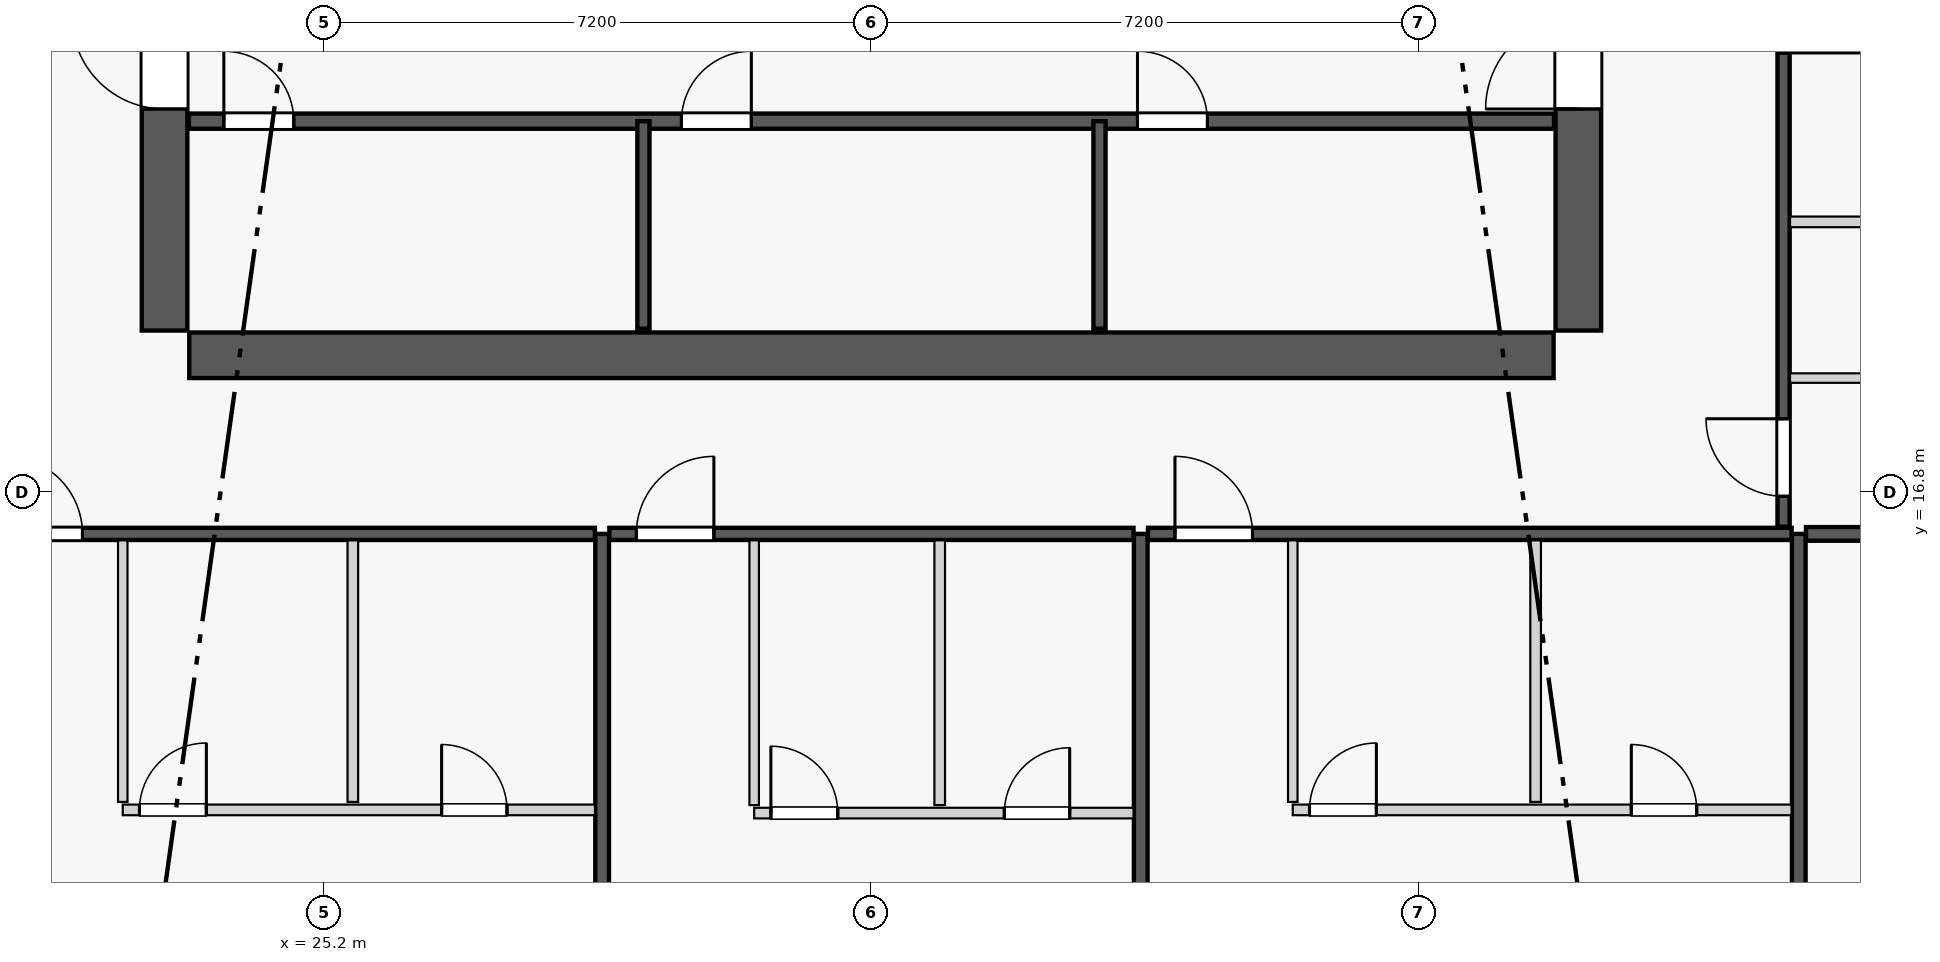
"""IFC4 building model, lengths in metres.
Left out: names, types, materials, properties, quantities, classifications, styles, units other than length and angle.
Written with IfcOpenShell. Run it as: python <this file> out.ifc"""

import sys

from ifc_helpers import new_model, si_unit, direction, frame, frame_2d, origin, origin_2d, place, context, subcontext, project, spatial, rectangle, extrude, element, fill, save


model = new_model("IFC4")
c1 = context("Model", 3, precision=1e-05, world=origin(), true_north=direction((0.0, 1.0)))
c2 = subcontext(c1, "Body", "Model", "MODEL_VIEW")
j1 = project(units=[si_unit("LENGTHUNIT", "METRE"), si_unit("PLANEANGLEUNIT", "RADIAN")], contexts=[c1])
p1 = place(None, origin())
s1 = spatial("IfcSite", under=j1, at=p1, CompositionType="ELEMENT")
p2 = place(p1, origin())
s2 = spatial("IfcBuilding", under=s1, at=p2, CompositionType="ELEMENT")
p3 = place(p2, frame((0.0, 0.0, 186.1)))
s3 = spatial("IfcBuildingStorey", under=s2, at=p3, CompositionType="ELEMENT", Elevation=186.1)
for number, where, z_axis, x_axis in (
    (1, (23.1, 18.6, 0.0), (0.0, 0.0, 1.0), (1.0, 0.0, 0.0)),
    (2, (41.7, 18.6, 0.0), (0.0, 0.0, 1.0), (1.0, 0.0, 0.0)),
):
    element("IfcColumn", number, at=place(p3, frame(where, z_axis=z_axis, x_axis=x_axis)), inside=s3, PredefinedType="COLUMN", context=c2, shape_type="SweptSolid", body=[
        extrude(rectangle(XDim=0.65, YDim=0.65, at=origin_2d()), origin(), (0.0, 0.0, 1.0), 3.55),
    ])
p4 = place(p3, frame((23.425, 18.6, 0.0), z_axis=(0.0, 0.0, 1.0), x_axis=(1.0, 0.0, 0.0)))
e3 = element("IfcWall", 3, at=p4, inside=s3, PredefinedType="SHEAR", context=c2, shape_type="SweptSolid", body=[
    extrude(rectangle(XDim=17.95, YDim=0.6, at=frame_2d((8.975, 0.0))), origin(), (0.0, 0.0, 1.0), 3.35),
])
p5 = place(p3, frame((23.1, 18.925, 0.0), z_axis=(0.0, 0.0, 1.0), x_axis=(0.0, 1.0, 0.0)))
e4 = element("IfcWall", 4, at=p5, inside=s3, PredefinedType="SHEAR", context=c2, shape_type="SweptSolid", body=[
    extrude(rectangle(XDim=13.95, YDim=0.6, at=frame_2d((6.975, 0.0))), origin(), (0.0, 0.0, 1.0), 3.35),
])
p6 = place(p5, frame((2.915, 0.0, 0.0)))
e5 = element("IfcOpeningElement", 5, at=p6, cuts=e4, PredefinedType="OPENING", context=c2, shape_type="SweptSolid", body=[
    extrude(rectangle(XDim=1.22, YDim=2.25, at=frame_2d((0.61, 1.125))), frame((0.0, 0.31, 0.0), z_axis=(0.0, -1.0, 0.0), x_axis=(1.0, 0.0, 0.0)), (0.0, 0.0, 1.0), 0.62),
])
p7 = place(p3, frame((41.7, 18.925, 0.0), z_axis=(0.0, 0.0, 1.0), x_axis=(0.0, 1.0, 0.0)))
e6 = element("IfcWall", 6, at=p7, inside=s3, PredefinedType="SHEAR", context=c2, shape_type="SweptSolid", body=[
    extrude(rectangle(XDim=13.95, YDim=0.6, at=frame_2d((6.975, 0.0))), origin(), (0.0, 0.0, 1.0), 3.35),
])
p8 = place(p7, frame((2.915, 0.0, 0.0)))
e7 = element("IfcOpeningElement", 7, at=p8, cuts=e6, PredefinedType="OPENING", context=c2, shape_type="SweptSolid", body=[
    extrude(rectangle(XDim=1.22, YDim=2.25, at=frame_2d((0.61, 1.125))), frame((0.0, 0.31, 0.0), z_axis=(0.0, -1.0, 0.0), x_axis=(1.0, 0.0, 0.0)), (0.0, 0.0, 1.0), 0.62),
])
p9 = place(p3, frame((23.42, 21.68, 0.0), z_axis=(0.0, 0.0, 1.0), x_axis=(1.0, 0.0, 0.0)))
e8 = element("IfcWall", 8, at=p9, inside=s3, PredefinedType="PLUMBINGWALL", context=c2, shape_type="SweptSolid", body=[
    extrude(rectangle(XDim=17.96, YDim=0.2, at=frame_2d((8.98, 0.0))), origin(), (0.0, 0.0, 1.0), 3.35),
])
p10 = place(p9, frame((0.46, 0.0, 0.0)))
e9 = element("IfcOpeningElement", 9, at=p10, cuts=e8, PredefinedType="OPENING", context=c2, shape_type="SweptSolid", body=[
    extrude(rectangle(XDim=0.92, YDim=2.15, at=frame_2d((0.46, 1.075))), frame((0.0, 0.11, 0.0), z_axis=(0.0, -1.0, 0.0), x_axis=(1.0, 0.0, 0.0)), (0.0, 0.0, 1.0), 0.22),
])
p11 = place(p9, frame((6.48, 0.0, 0.0)))
e10 = element("IfcOpeningElement", 10, at=p11, cuts=e8, PredefinedType="OPENING", context=c2, shape_type="SweptSolid", body=[
    extrude(rectangle(XDim=0.92, YDim=2.15, at=frame_2d((0.46, 1.075))), frame((0.0, 0.11, 0.0), z_axis=(0.0, -1.0, 0.0), x_axis=(1.0, 0.0, 0.0)), (0.0, 0.0, 1.0), 0.22),
])
p12 = place(p9, frame((12.48, 0.0, 0.0)))
e11 = element("IfcOpeningElement", 11, at=p12, cuts=e8, PredefinedType="OPENING", context=c2, shape_type="SweptSolid", body=[
    extrude(rectangle(XDim=0.92, YDim=2.15, at=frame_2d((0.46, 1.075))), frame((0.0, 0.11, 0.0), z_axis=(0.0, -1.0, 0.0), x_axis=(1.0, 0.0, 0.0)), (0.0, 0.0, 1.0), 0.22),
])
for number, where, z_axis, x_axis in (
    (12, (29.4, 18.95, 0.0), (0.0, 0.0, 1.0), (0.0, 1.0, 0.0)),
    (13, (35.4, 18.95, 0.0), (0.0, 0.0, 1.0), (0.0, 1.0, 0.0)),
):
    element("IfcWall", number, at=place(p3, frame(where, z_axis=z_axis, x_axis=x_axis)), inside=s3, PredefinedType="PARTITIONING", context=c2, shape_type="SweptSolid", body=[
        extrude(rectangle(XDim=2.73, YDim=0.16, at=frame_2d((1.365, 0.0))), origin(), (0.0, 0.0, 1.0), 3.35),
    ])
for number, where, z_axis, x_axis in (
    (14, (28.857, 5.755, 0.0), (0.0, 0.0, 1.0), (0.0, 1.0, 0.0)),
    (15, (35.943, 5.755, 0.0), (0.0, 0.0, 1.0), (0.0, 1.0, 0.0)),
):
    element("IfcWall", number, at=place(p3, frame(where, z_axis=z_axis, x_axis=x_axis)), inside=s3, PredefinedType="PARTITIONING", context=c2, shape_type="SweptSolid", body=[
        extrude(rectangle(XDim=10.495, YDim=0.18, at=frame_2d((5.248, 0.0))), origin(), (0.0, 0.0, 1.0), 2.807),
    ])
p13 = place(p3, frame((44.6, 5.968, 0.0), z_axis=(0.0, 0.0, 1.0), x_axis=(0.0, 1.0, 0.0)))
e16 = element("IfcWall", 16, at=p13, inside=s3, PredefinedType="PARTITIONING", context=c2, shape_type="SweptSolid", body=[
    extrude(rectangle(XDim=10.282, YDim=0.18, at=frame_2d((5.141, 0.0))), origin(), (0.0, 0.0, 1.0), 3.35),
])
p14 = place(p3, frame((20.295, 16.25, 0.0), z_axis=(0.0, 0.0, 1.0), x_axis=(1.0, 0.0, 0.0)))
e17 = element("IfcWall", 17, at=p14, inside=s3, PredefinedType="PARTITIONING", context=c2, shape_type="SweptSolid", body=[
    extrude(rectangle(XDim=8.467, YDim=0.16, at=frame_2d((4.233, 0.0))), origin(), (0.0, 0.0, 1.0), 3.35),
])
p15 = place(p14, frame((0.705, 0.0, 0.0)))
e18 = element("IfcOpeningElement", 18, at=p15, cuts=e17, PredefinedType="OPENING", context=c2, shape_type="SweptSolid", body=[
    extrude(rectangle(XDim=1.02, YDim=2.25, at=frame_2d((0.51, 1.125))), frame((0.0, 0.09, 0.0), z_axis=(0.0, -1.0, 0.0), x_axis=(1.0, 0.0, 0.0)), (0.0, 0.0, 1.0), 0.18),
])
p16 = place(p3, frame((22.55, 12.724, 0.0), z_axis=(0.0, 0.0, 1.0), x_axis=(0.0, 1.0, 0.0)))
e19 = element("IfcWall", 19, at=p16, inside=s3, PredefinedType="PARTITIONING", context=c2, shape_type="SweptSolid", body=[
    extrude(rectangle(XDim=3.441, YDim=0.125, at=frame_2d((1.72, 0.0))), origin(), (0.0, 0.0, 1.0), 2.807),
])
p17 = place(p3, frame((22.55, 12.619, 0.0), z_axis=(0.0, 0.0, 1.0), x_axis=(1.0, 0.0, 0.0)))
e20 = element("IfcWall", 20, at=p17, inside=s3, PredefinedType="PLUMBINGWALL", context=c2, shape_type="SweptSolid", body=[
    extrude(rectangle(XDim=6.212, YDim=0.14, at=frame_2d((3.106, 0.0))), origin(), (0.0, 0.0, 1.0), 3.35),
])
p18 = place(p17, frame((4.195, 0.0, 0.0)))
e21 = element("IfcOpeningElement", 21, at=p18, cuts=e20, PredefinedType="OPENING", context=c2, shape_type="SweptSolid", body=[
    extrude(rectangle(XDim=0.86, YDim=2.1, at=frame_2d((0.43, 1.05))), frame((0.0, 0.08, 0.0), z_axis=(0.0, -1.0, 0.0), x_axis=(1.0, 0.0, 0.0)), (0.0, 0.0, 1.0), 0.16),
])
p19 = place(p17, frame((0.22, 0.0, 0.0)))
e22 = element("IfcOpeningElement", 22, at=p19, cuts=e20, PredefinedType="OPENING", context=c2, shape_type="SweptSolid", body=[
    extrude(rectangle(XDim=0.88, YDim=2.15, at=frame_2d((0.44, 1.075))), frame((0.0, 0.08, 0.0), z_axis=(0.0, -1.0, 0.0), x_axis=(1.0, 0.0, 0.0)), (0.0, 0.0, 1.0), 0.16),
])
p20 = place(p3, frame((25.577, 12.724, 0.0), z_axis=(0.0, 0.0, 1.0), x_axis=(0.0, 1.0, 0.0)))
e23 = element("IfcWall", 23, at=p20, inside=s3, PredefinedType="PLUMBINGWALL", context=c2, shape_type="SweptSolid", body=[
    extrude(rectangle(XDim=3.441, YDim=0.14, at=frame_2d((1.72, 0.0))), origin(), (0.0, 0.0, 1.0), 3.35),
])
p21 = place(p3, frame((28.952, 16.25, 0.0), z_axis=(0.0, 0.0, 1.0), x_axis=(1.0, 0.0, 0.0)))
e24 = element("IfcWall", 24, at=p21, inside=s3, PredefinedType="PARTITIONING", context=c2, shape_type="SweptSolid", body=[
    extrude(rectangle(XDim=6.896, YDim=0.16, at=frame_2d((3.448, 0.0))), origin(), (0.0, 0.0, 1.0), 3.35),
])
p22 = place(p21, frame((0.355, 0.0, 0.0)))
e25 = element("IfcOpeningElement", 25, at=p22, cuts=e24, PredefinedType="OPENING", context=c2, shape_type="SweptSolid", body=[
    extrude(rectangle(XDim=1.02, YDim=2.25, at=frame_2d((0.51, 1.125))), frame((0.0, 0.09, 0.0), z_axis=(0.0, -1.0, 0.0), x_axis=(1.0, 0.0, 0.0)), (0.0, 0.0, 1.0), 0.18),
])
p23 = place(p3, frame((30.857, 12.682, 0.0), z_axis=(0.0, 0.0, 1.0), x_axis=(0.0, 1.0, 0.0)))
e26 = element("IfcWall", 26, at=p23, inside=s3, PredefinedType="PARTITIONING", context=c2, shape_type="SweptSolid", body=[
    extrude(rectangle(XDim=3.483, YDim=0.125, at=frame_2d((1.742, 0.0))), origin(), (0.0, 0.0, 1.0), 3.35),
])
p24 = place(p3, frame((30.857, 12.577, 0.0), z_axis=(0.0, 0.0, 1.0), x_axis=(1.0, 0.0, 0.0)))
e27 = element("IfcWall", 27, at=p24, inside=s3, PredefinedType="PLUMBINGWALL", context=c2, shape_type="SweptSolid", body=[
    extrude(rectangle(XDim=4.991, YDim=0.14, at=frame_2d((2.496, 0.0))), origin(), (0.0, 0.0, 1.0), 3.35),
])
p25 = place(p24, frame((3.291, 0.0, 0.0)))
e28 = element("IfcOpeningElement", 28, at=p25, cuts=e27, PredefinedType="OPENING", context=c2, shape_type="SweptSolid", body=[
    extrude(rectangle(XDim=0.86, YDim=2.1, at=frame_2d((0.43, 1.05))), frame((0.0, 0.08, 0.0), z_axis=(0.0, -1.0, 0.0), x_axis=(1.0, 0.0, 0.0)), (0.0, 0.0, 1.0), 0.16),
])
p26 = place(p24, frame((0.22, 0.0, 0.0)))
e29 = element("IfcOpeningElement", 29, at=p26, cuts=e27, PredefinedType="OPENING", context=c2, shape_type="SweptSolid", body=[
    extrude(rectangle(XDim=0.88, YDim=2.15, at=frame_2d((0.44, 1.075))), frame((0.0, 0.08, 0.0), z_axis=(0.0, -1.0, 0.0), x_axis=(1.0, 0.0, 0.0)), (0.0, 0.0, 1.0), 0.16),
])
p27 = place(p3, frame((33.298, 12.682, 0.0), z_axis=(0.0, 0.0, 1.0), x_axis=(0.0, 1.0, 0.0)))
e30 = element("IfcWall", 30, at=p27, inside=s3, PredefinedType="PLUMBINGWALL", context=c2, shape_type="SweptSolid", body=[
    extrude(rectangle(XDim=3.483, YDim=0.14, at=frame_2d((1.742, 0.0))), origin(), (0.0, 0.0, 1.0), 3.35),
])
p28 = place(p3, frame((36.038, 16.25, 0.0), z_axis=(0.0, 0.0, 1.0), x_axis=(1.0, 0.0, 0.0)))
e31 = element("IfcWall", 31, at=p28, inside=s3, PredefinedType="PARTITIONING", context=c2, shape_type="SweptSolid", body=[
    extrude(rectangle(XDim=8.467, YDim=0.16, at=frame_2d((4.233, 0.0))), origin(), (0.0, 0.0, 1.0), 3.35),
])
p29 = place(p28, frame((0.355, 0.0, 0.0)))
e32 = element("IfcOpeningElement", 32, at=p29, cuts=e31, PredefinedType="OPENING", context=c2, shape_type="SweptSolid", body=[
    extrude(rectangle(XDim=1.02, YDim=2.25, at=frame_2d((0.51, 1.125))), frame((0.0, 0.09, 0.0), z_axis=(0.0, -1.0, 0.0), x_axis=(1.0, 0.0, 0.0)), (0.0, 0.0, 1.0), 0.18),
])
p30 = place(p3, frame((37.943, 12.724, 0.0), z_axis=(0.0, 0.0, 1.0), x_axis=(0.0, 1.0, 0.0)))
e33 = element("IfcWall", 33, at=p30, inside=s3, PredefinedType="PARTITIONING", context=c2, shape_type="SweptSolid", body=[
    extrude(rectangle(XDim=3.441, YDim=0.125, at=frame_2d((1.72, 0.0))), origin(), (0.0, 0.0, 1.0), 3.35),
])
p31 = place(p3, frame((37.943, 12.619, 0.0), z_axis=(0.0, 0.0, 1.0), x_axis=(1.0, 0.0, 0.0)))
e34 = element("IfcWall", 34, at=p31, inside=s3, PredefinedType="PLUMBINGWALL", context=c2, shape_type="SweptSolid", body=[
    extrude(rectangle(XDim=6.562, YDim=0.14, at=frame_2d((3.281, 0.0))), origin(), (0.0, 0.0, 1.0), 3.35),
])
p32 = place(p31, frame((4.454, 0.0, 0.0)))
e35 = element("IfcOpeningElement", 35, at=p32, cuts=e34, PredefinedType="OPENING", context=c2, shape_type="SweptSolid", body=[
    extrude(rectangle(XDim=0.86, YDim=2.1, at=frame_2d((0.43, 1.05))), frame((0.0, 0.08, 0.0), z_axis=(0.0, -1.0, 0.0), x_axis=(1.0, 0.0, 0.0)), (0.0, 0.0, 1.0), 0.16),
])
p33 = place(p31, frame((0.22, 0.0, 0.0)))
e36 = element("IfcOpeningElement", 36, at=p33, cuts=e34, PredefinedType="OPENING", context=c2, shape_type="SweptSolid", body=[
    extrude(rectangle(XDim=0.88, YDim=2.15, at=frame_2d((0.44, 1.075))), frame((0.0, 0.08, 0.0), z_axis=(0.0, -1.0, 0.0), x_axis=(1.0, 0.0, 0.0)), (0.0, 0.0, 1.0), 0.16),
])
p34 = place(p3, frame((41.138, 12.724, 0.0), z_axis=(0.0, 0.0, 1.0), x_axis=(0.0, 1.0, 0.0)))
e37 = element("IfcWall", 37, at=p34, inside=s3, PredefinedType="PLUMBINGWALL", context=c2, shape_type="SweptSolid", body=[
    extrude(rectangle(XDim=3.441, YDim=0.14, at=frame_2d((1.72, 0.0))), origin(), (0.0, 0.0, 1.0), 3.35),
])
p35 = place(p3, frame((44.695, 16.25, 0.0), z_axis=(0.0, 0.0, 1.0), x_axis=(1.0, 0.0, 0.0)))
e38 = element("IfcWall", 38, at=p35, inside=s3, PredefinedType="PARTITIONING", context=c2, shape_type="SweptSolid", body=[
    extrude(rectangle(XDim=5.894, YDim=0.18, at=frame_2d((2.947, 0.0))), origin(), (0.0, 0.0, 1.0), 3.35),
])
p36 = place(p3, frame((44.4, 16.345, 0.0), z_axis=(0.0, 0.0, 1.0), x_axis=(0.0, 1.0, 0.0)))
e39 = element("IfcWall", 39, at=p36, inside=s3, PredefinedType="PARTITIONING", context=c2, shape_type="SweptSolid", body=[
    extrude(rectangle(XDim=6.236, YDim=0.16, at=frame_2d((3.118, 0.0))), origin(), (0.0, 0.0, 1.0), 3.35),
])
p37 = place(p36, frame((0.4, 0.0, 0.0)))
e40 = element("IfcOpeningElement", 40, at=p37, cuts=e39, PredefinedType="OPENING", context=c2, shape_type="SweptSolid", body=[
    extrude(rectangle(XDim=1.02, YDim=2.25, at=frame_2d((0.51, 1.125))), frame((0.0, 0.09, 0.0), z_axis=(0.0, -1.0, 0.0), x_axis=(1.0, 0.0, 0.0)), (0.0, 0.0, 1.0), 0.18),
])
p38 = place(p3, frame((44.485, 18.3, 0.0), z_axis=(0.0, 0.0, 1.0), x_axis=(1.0, 0.0, 0.0)))
e41 = element("IfcWall", 41, at=p38, inside=s3, PredefinedType="PARTITIONING", context=c2, shape_type="SweptSolid", body=[
    extrude(rectangle(XDim=2.43, YDim=0.125, at=frame_2d((1.215, 0.0))), origin(), (0.0, 0.0, 1.0), 2.807),
])
p39 = place(p3, frame((44.485, 20.355, 0.0), z_axis=(0.0, 0.0, 1.0), x_axis=(1.0, 0.0, 0.0)))
e42 = element("IfcWall", 42, at=p39, inside=s3, PredefinedType="PLUMBINGWALL", context=c2, shape_type="SweptSolid", body=[
    extrude(rectangle(XDim=2.43, YDim=0.14, at=frame_2d((1.215, 0.0))), origin(), (0.0, 0.0, 1.0), 3.35),
])
p40 = place(p6, origin())
e43 = element("IfcDoor", 43, at=p40, inside=s3, OperationType="SINGLE_SWING_RIGHT", PredefinedType="DOOR", context=c2, shape_type="SweptSolid", body=[
    extrude(rectangle(XDim=1.22, YDim=2.25, at=frame_2d((0.61, 1.125))), frame((0.0, 0.025, 0.0), z_axis=(0.0, -1.0, 0.0), x_axis=(1.0, 0.0, 0.0)), (0.0, 0.0, 1.0), 0.05),
])
fill(e5, e43)
p41 = place(p8, origin())
e44 = element("IfcDoor", 44, at=p41, inside=s3, OperationType="SINGLE_SWING_LEFT", PredefinedType="DOOR", context=c2, shape_type="SweptSolid", body=[
    extrude(rectangle(XDim=1.22, YDim=2.25, at=frame_2d((0.61, 1.125))), frame((0.0, 0.025, 0.0), z_axis=(0.0, -1.0, 0.0), x_axis=(1.0, 0.0, 0.0)), (0.0, 0.0, 1.0), 0.05),
])
fill(e7, e44)
p42 = place(p10, origin())
e45 = element("IfcDoor", 45, at=p42, inside=s3, OperationType="SINGLE_SWING_LEFT", PredefinedType="DOOR", context=c2, shape_type="SweptSolid", body=[
    extrude(rectangle(XDim=0.92, YDim=2.15, at=frame_2d((0.46, 1.075))), frame((0.0, 0.025, 0.0), z_axis=(0.0, -1.0, 0.0), x_axis=(1.0, 0.0, 0.0)), (0.0, 0.0, 1.0), 0.05),
])
fill(e9, e45)
p43 = place(p11, origin())
e46 = element("IfcDoor", 46, at=p43, inside=s3, OperationType="SINGLE_SWING_RIGHT", PredefinedType="DOOR", context=c2, shape_type="SweptSolid", body=[
    extrude(rectangle(XDim=0.92, YDim=2.15, at=frame_2d((0.46, 1.075))), frame((0.0, 0.025, 0.0), z_axis=(0.0, -1.0, 0.0), x_axis=(1.0, 0.0, 0.0)), (0.0, 0.0, 1.0), 0.05),
])
fill(e10, e46)
p44 = place(p12, origin())
e47 = element("IfcDoor", 47, at=p44, inside=s3, OperationType="SINGLE_SWING_LEFT", PredefinedType="DOOR", context=c2, shape_type="SweptSolid", body=[
    extrude(rectangle(XDim=0.92, YDim=2.15, at=frame_2d((0.46, 1.075))), frame((0.0, 0.025, 0.0), z_axis=(0.0, -1.0, 0.0), x_axis=(1.0, 0.0, 0.0)), (0.0, 0.0, 1.0), 0.05),
])
fill(e11, e47)
p45 = place(p18, origin())
e48 = element("IfcDoor", 48, at=p45, inside=s3, OperationType="SINGLE_SWING_LEFT", PredefinedType="DOOR", context=c2, shape_type="SweptSolid", body=[
    extrude(rectangle(XDim=0.86, YDim=2.1, at=frame_2d((0.43, 1.05))), frame((0.0, 0.025, 0.0), z_axis=(0.0, -1.0, 0.0), x_axis=(1.0, 0.0, 0.0)), (0.0, 0.0, 1.0), 0.05),
])
fill(e21, e48)
p46 = place(p15, origin())
e49 = element("IfcDoor", 49, at=p46, inside=s3, OperationType="SINGLE_SWING_LEFT", PredefinedType="DOOR", context=c2, shape_type="SweptSolid", body=[
    extrude(rectangle(XDim=1.02, YDim=2.25, at=frame_2d((0.51, 1.125))), frame((0.0, 0.025, 0.0), z_axis=(0.0, -1.0, 0.0), x_axis=(1.0, 0.0, 0.0)), (0.0, 0.0, 1.0), 0.05),
])
fill(e18, e49)
p47 = place(p19, origin())
e50 = element("IfcDoor", 50, at=p47, inside=s3, OperationType="SINGLE_SWING_RIGHT", PredefinedType="DOOR", context=c2, shape_type="SweptSolid", body=[
    extrude(rectangle(XDim=0.88, YDim=2.15, at=frame_2d((0.44, 1.075))), frame((0.0, 0.025, 0.0), z_axis=(0.0, -1.0, 0.0), x_axis=(1.0, 0.0, 0.0)), (0.0, 0.0, 1.0), 0.05),
])
fill(e22, e50)
p48 = place(p25, origin())
e51 = element("IfcDoor", 51, at=p48, inside=s3, OperationType="SINGLE_SWING_RIGHT", PredefinedType="DOOR", context=c2, shape_type="SweptSolid", body=[
    extrude(rectangle(XDim=0.86, YDim=2.1, at=frame_2d((0.43, 1.05))), frame((0.0, 0.025, 0.0), z_axis=(0.0, -1.0, 0.0), x_axis=(1.0, 0.0, 0.0)), (0.0, 0.0, 1.0), 0.05),
])
fill(e28, e51)
p49 = place(p22, origin())
e52 = element("IfcDoor", 52, at=p49, inside=s3, OperationType="SINGLE_SWING_RIGHT", PredefinedType="DOOR", context=c2, shape_type="SweptSolid", body=[
    extrude(rectangle(XDim=1.02, YDim=2.25, at=frame_2d((0.51, 1.125))), frame((0.0, 0.025, 0.0), z_axis=(0.0, -1.0, 0.0), x_axis=(1.0, 0.0, 0.0)), (0.0, 0.0, 1.0), 0.05),
])
fill(e25, e52)
p50 = place(p26, origin())
e53 = element("IfcDoor", 53, at=p50, inside=s3, OperationType="SINGLE_SWING_LEFT", PredefinedType="DOOR", context=c2, shape_type="SweptSolid", body=[
    extrude(rectangle(XDim=0.88, YDim=2.15, at=frame_2d((0.44, 1.075))), frame((0.0, 0.025, 0.0), z_axis=(0.0, -1.0, 0.0), x_axis=(1.0, 0.0, 0.0)), (0.0, 0.0, 1.0), 0.05),
])
fill(e29, e53)
p51 = place(p32, origin())
e54 = element("IfcDoor", 54, at=p51, inside=s3, OperationType="SINGLE_SWING_LEFT", PredefinedType="DOOR", context=c2, shape_type="SweptSolid", body=[
    extrude(rectangle(XDim=0.86, YDim=2.1, at=frame_2d((0.43, 1.05))), frame((0.0, 0.025, 0.0), z_axis=(0.0, -1.0, 0.0), x_axis=(1.0, 0.0, 0.0)), (0.0, 0.0, 1.0), 0.05),
])
fill(e35, e54)
p52 = place(p29, origin())
e55 = element("IfcDoor", 55, at=p52, inside=s3, OperationType="SINGLE_SWING_LEFT", PredefinedType="DOOR", context=c2, shape_type="SweptSolid", body=[
    extrude(rectangle(XDim=1.02, YDim=2.25, at=frame_2d((0.51, 1.125))), frame((0.0, 0.025, 0.0), z_axis=(0.0, -1.0, 0.0), x_axis=(1.0, 0.0, 0.0)), (0.0, 0.0, 1.0), 0.05),
])
fill(e32, e55)
p53 = place(p33, origin())
e56 = element("IfcDoor", 56, at=p53, inside=s3, OperationType="SINGLE_SWING_RIGHT", PredefinedType="DOOR", context=c2, shape_type="SweptSolid", body=[
    extrude(rectangle(XDim=0.88, YDim=2.15, at=frame_2d((0.44, 1.075))), frame((0.0, 0.025, 0.0), z_axis=(0.0, -1.0, 0.0), x_axis=(1.0, 0.0, 0.0)), (0.0, 0.0, 1.0), 0.05),
])
fill(e36, e56)
p54 = place(p37, origin())
e57 = element("IfcDoor", 57, at=p54, inside=s3, OperationType="SINGLE_SWING_RIGHT", PredefinedType="DOOR", context=c2, shape_type="SweptSolid", body=[
    extrude(rectangle(XDim=1.02, YDim=2.25, at=frame_2d((0.51, 1.125))), frame((0.0, 0.025, 0.0), z_axis=(0.0, -1.0, 0.0), x_axis=(1.0, 0.0, 0.0)), (0.0, 0.0, 1.0), 0.05),
])
fill(e40, e57)
save(model, sys.argv[1])
